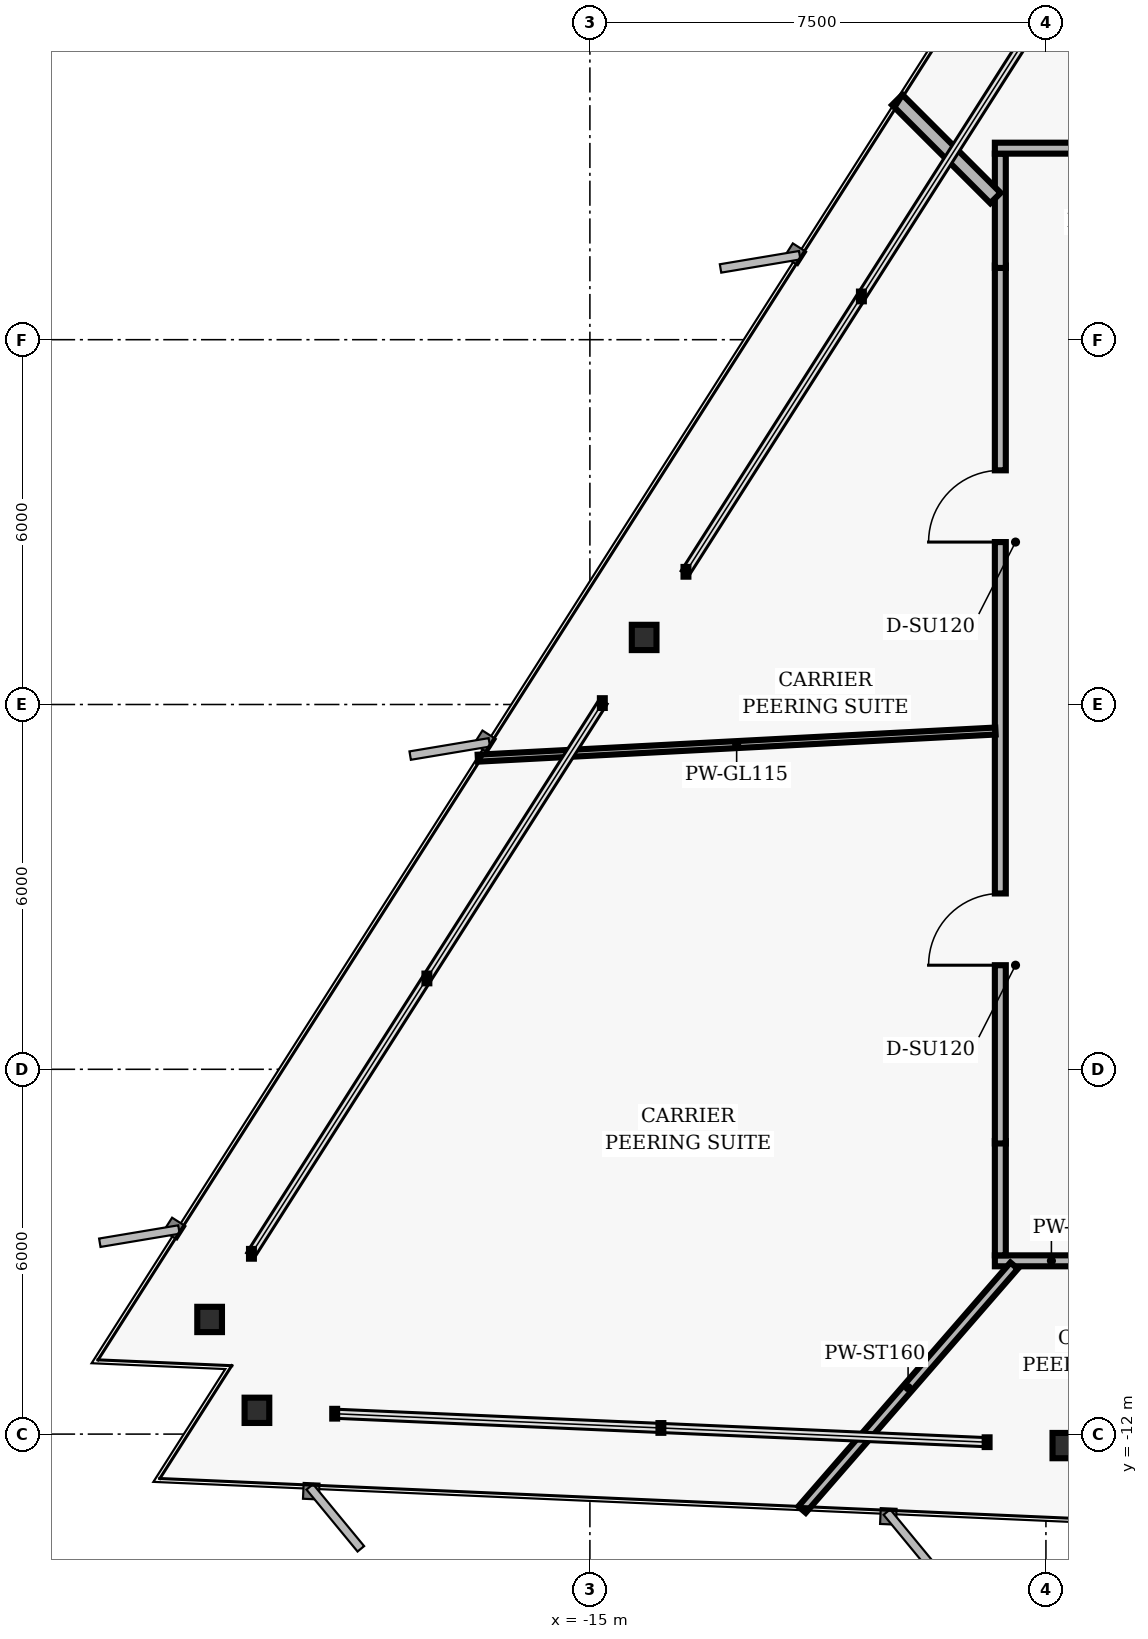
"""IFC4 building model, lengths in metres.
Left out: names, types, materials, properties, quantities, classifications, styles, units other than length and angle.
Written with IfcOpenShell. Run it as: python <this file> out.ifc"""

import sys

from ifc_helpers import new_model, si_unit, direction, frame, frame_2d, origin, origin_2d, place, context, subcontext, project, spatial, rectangle, i_section, extrude, element, fill, save


model = new_model("IFC4")
c1 = context("Model", 3, precision=1e-05, world=origin(), true_north=direction((0.0, 1.0)))
c2 = subcontext(c1, "Body", "Model", "MODEL_VIEW")
j1 = project(units=[si_unit("LENGTHUNIT", "METRE"), si_unit("PLANEANGLEUNIT", "RADIAN")], contexts=[c1])
p1 = place(None, origin())
s1 = spatial("IfcSite", under=j1, at=p1, CompositionType="ELEMENT")
p2 = place(p1, origin())
s2 = spatial("IfcBuilding", under=s1, at=p2, CompositionType="ELEMENT")
p3 = place(p2, frame((0.0, 0.0, 125.92)))
s3 = spatial("IfcBuildingStorey", under=s2, at=p3, CompositionType="ELEMENT", Elevation=125.92)
for number, where, z_axis, x_axis in (
    (1, (-14.108, 1.103, 0.0), (0.0, 0.0, 1.0), (1.0, 0.0, 0.0)),
    (2, (-21.254, -10.114, 0.0), (0.0, 0.0, 1.0), (1.0, 0.0, 0.0)),
    (3, (-20.476, -11.609, 0.0), (0.0, 0.0, 1.0), (1.0, 0.0, 0.0)),
    (4, (-7.188, -12.189, 0.0), (0.0, 0.0, 1.0), (1.0, 0.0, 0.0)),
):
    element("IfcColumn", number, at=place(p3, frame(where, z_axis=z_axis, x_axis=x_axis)), inside=s3, PredefinedType="COLUMN", context=c2, shape_type="SweptSolid", body=[
        extrude(i_section(OverallWidth=0.406, OverallDepth=0.416, WebThickness=0.03, FlangeThickness=0.048, FilletRadius=0.02, at=origin_2d()), origin(), (0.0, 0.0, 1.0), 3.04),
    ])
p4 = place(p3, frame((-6.48, -9.15, 0.0), z_axis=(0.0, 0.0, 1.0), x_axis=(-1.0, 0.0, 0.0)))
e5 = element("IfcWall", 5, at=p4, inside=s3, PredefinedType="PARTITIONING", context=c2, shape_type="SweptSolid", body=[
    extrude(rectangle(XDim=1.86, YDim=0.18, at=frame_2d((0.93, 0.0))), origin(), (0.0, 0.0, 1.0), 2.33),
])
p5 = place(p3, frame((-8.25, -9.06, 0.0), z_axis=(0.0, 0.0, 1.0), x_axis=(0.0, 1.0, 0.0)))
e6 = element("IfcWall", 6, at=p5, inside=s3, PredefinedType="PARTITIONING", context=c2, shape_type="SweptSolid", body=[
    extrude(rectangle(XDim=1.88, YDim=0.18, at=frame_2d((0.94, 0.0))), origin(), (0.0, 0.0, 1.0), 2.763),
])
p6 = place(p3, frame((-8.25, -7.22, 0.0), z_axis=(0.0, 0.0, 1.0), x_axis=(0.0, 1.0, 0.0)))
e7 = element("IfcWall", 7, at=p6, inside=s3, PredefinedType="PARTITIONING", context=c2, shape_type="SweptSolid", body=[
    extrude(rectangle(XDim=14.44, YDim=0.18, at=frame_2d((7.22, 0.0))), origin(), (0.0, 0.0, 1.0), 2.763),
])
p7 = place(p6, frame((2.932, 0.0, 0.0)))
e8 = element("IfcOpeningElement", 8, at=p7, cuts=e7, PredefinedType="OPENING", context=c2, shape_type="SweptSolid", body=[
    extrude(rectangle(XDim=1.18, YDim=2.02, at=frame_2d((0.59, 1.01))), frame((0.0, 0.1, 0.0), z_axis=(0.0, -1.0, 0.0), x_axis=(1.0, 0.0, 0.0)), (0.0, 0.0, 1.0), 0.2),
])
p8 = place(p6, frame((9.892, 0.0, 0.0)))
e9 = element("IfcOpeningElement", 9, at=p8, cuts=e7, PredefinedType="OPENING", context=c2, shape_type="SweptSolid", body=[
    extrude(rectangle(XDim=1.18, YDim=2.02, at=frame_2d((0.59, 1.01))), frame((0.0, 0.1, 0.0), z_axis=(0.0, -1.0, 0.0), x_axis=(1.0, 0.0, 0.0)), (0.0, 0.0, 1.0), 0.2),
])
p9 = place(p3, frame((-8.25, 7.18, 0.0), z_axis=(0.0, 0.0, 1.0), x_axis=(0.0, 1.0, 0.0)))
e10 = element("IfcWall", 10, at=p9, inside=s3, PredefinedType="PARTITIONING", context=c2, shape_type="SweptSolid", body=[
    extrude(rectangle(XDim=1.88, YDim=0.18, at=frame_2d((0.94, 0.0))), origin(), (0.0, 0.0, 1.0), 2.763),
])
p10 = place(p3, frame((-8.34, 9.15, 0.0), z_axis=(0.0, 0.0, 1.0), x_axis=(1.0, 0.0, 0.0)))
e11 = element("IfcWall", 11, at=p10, inside=s3, PredefinedType="PARTITIONING", context=c2, shape_type="SweptSolid", body=[
    extrude(rectangle(XDim=1.86, YDim=0.18, at=frame_2d((0.93, 0.0))), origin(), (0.0, 0.0, 1.0), 2.763),
])
p11 = place(p3, frame((-8.33, -0.437, 0.0), z_axis=(0.0, 0.0, 1.0), x_axis=(-0.998628646782, -0.052352897024, 0.0)))
e12 = element("IfcWall", 12, at=p11, inside=s3, PredefinedType="MOVABLE", context=c2, shape_type="SweptSolid", body=[
    extrude(rectangle(XDim=8.525, YDim=0.115, at=frame_2d((4.262, 0.0))), origin(), (0.0, 0.0, 1.0), 2.763),
])
p12 = place(p3, frame((-8.023, -9.23, 0.0), z_axis=(0.0, 0.0, 1.0), x_axis=(-0.656052478168, -0.754715274716, 0.0)))
e13 = element("IfcWall", 13, at=p12, inside=s3, PredefinedType="PARTITIONING", context=c2, shape_type="SweptSolid", body=[
    extrude(rectangle(XDim=5.315, YDim=0.16, at=frame_2d((2.658, 0.0))), origin(), (0.0, 0.0, 1.0), 2.763),
])
p13 = place(p3, frame((-8.33, 8.33, 0.0), z_axis=(0.0, 0.0, 1.0), x_axis=(-0.707106781187, 0.707106781187, 0.0)))
e14 = element("IfcWall", 14, at=p13, inside=s3, PredefinedType="PARTITIONING", context=c2, shape_type="SweptSolid", body=[
    extrude(rectangle(XDim=2.284, YDim=0.24, at=frame_2d((1.142, 0.0))), origin(), (0.0, 0.0, 1.0), 2.763),
])
p14 = place(p7, origin())
e15 = element("IfcDoor", 15, at=p14, inside=s3, OperationType="SINGLE_SWING_LEFT", PredefinedType="DOOR", context=c2, shape_type="SweptSolid", body=[
    extrude(rectangle(XDim=1.18, YDim=2.02, at=frame_2d((0.59, 1.01))), frame((0.0, 0.025, 0.0), z_axis=(0.0, -1.0, 0.0), x_axis=(1.0, 0.0, 0.0)), (0.0, 0.0, 1.0), 0.05),
])
fill(e8, e15)
p15 = place(p8, origin())
e16 = element("IfcDoor", 16, at=p15, inside=s3, OperationType="SINGLE_SWING_LEFT", PredefinedType="DOOR", context=c2, shape_type="SweptSolid", body=[
    extrude(rectangle(XDim=1.18, YDim=2.02, at=frame_2d((0.59, 1.01))), frame((0.0, 0.025, 0.0), z_axis=(0.0, -1.0, 0.0), x_axis=(1.0, 0.0, 0.0)), (0.0, 0.0, 1.0), 0.05),
])
fill(e9, e16)
save(model, sys.argv[1])
